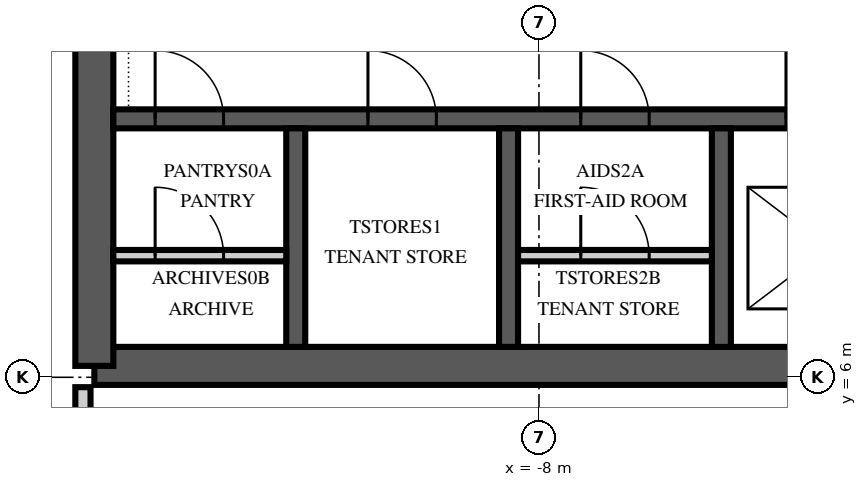
"""IFC4 building model, lengths in metres.
Left out: names, types, materials, properties, quantities, classifications, styles, units other than length and angle.
Written with IfcOpenShell. Run it as: python <this file> out.ifc"""

import sys

from ifc_helpers import new_model, si_unit, direction, frame, frame_2d, origin, place, context, subcontext, project, spatial, polyline, rectangle, outline, extrude, element, fill, save


model = new_model("IFC4")
c1 = context("Model", 3, precision=1e-05, world=origin(), true_north=direction((0.0, 1.0)))
c2 = subcontext(c1, "Body", "Model", "MODEL_VIEW")
j1 = project(units=[si_unit("LENGTHUNIT", "METRE"), si_unit("PLANEANGLEUNIT", "RADIAN")], contexts=[c1])
p1 = place(None, origin())
s1 = spatial("IfcSite", under=j1, at=p1, CompositionType="ELEMENT")
p2 = place(p1, origin())
s2 = spatial("IfcBuilding", under=s1, at=p2, CompositionType="ELEMENT")
p3 = place(p2, frame((0.0, 0.0, 312.0)))
s3 = spatial("IfcBuildingStorey", under=s2, at=p3, CompositionType="ELEMENT", Elevation=312.0)
p4 = place(p3, frame((-13.85, 6.15, 0.0), z_axis=(0.0, 0.0, 1.0), x_axis=(1.0, 0.0, 0.0)))
e1 = element("IfcWall", 1, at=p4, inside=s3, PredefinedType="SHEAR", context=c2, shape_type="SweptSolid", body=[
    extrude(rectangle(XDim=27.7, YDim=0.5, at=frame_2d((13.85, 0.0))), origin(), (0.0, 0.0, 1.0), 4.0),
])
p5 = place(p3, frame((-13.85, 23.85, 0.0), z_axis=(0.0, 0.0, 1.0), x_axis=(0.0, -1.0, 0.0)))
e2 = element("IfcWall", 2, at=p5, inside=s3, PredefinedType="SHEAR", context=c2, shape_type="SweptSolid", body=[
    extrude(outline(polyline([(0.0, -0.25), (17.7, -0.25), (17.7, 0.0), (17.45, 0.0), (17.45, 0.25), (0.25, 0.25), (0.25, 0.0), (0.0, 0.0), (0.0, -0.25)])), origin(), (0.0, 0.0, 1.0), 4.0),
])
p6 = place(p5, frame((11.75, 0.0, 0.0)))
e3 = element("IfcOpeningElement", 3, at=p6, cuts=e2, PredefinedType="OPENING", context=c2, shape_type="SweptSolid", body=[
    extrude(rectangle(XDim=1.8, YDim=2.4, at=frame_2d((0.9, 1.2))), frame((0.0, 0.265, 0.0), z_axis=(0.0, -1.0, 0.0), x_axis=(1.0, 0.0, 0.0)), (0.0, 0.0, 1.0), 0.53),
])
p7 = place(p3, frame((-13.6, 9.4, 0.0), z_axis=(0.0, 0.0, 1.0), x_axis=(1.0, 0.0, 0.0)))
e4 = element("IfcWall", 4, at=p7, inside=s3, PredefinedType="SHEAR", context=c2, shape_type="SweptSolid", body=[
    extrude(rectangle(XDim=27.2, YDim=0.25, at=frame_2d((13.6, 0.0))), origin(), (0.0, 0.0, 1.0), 4.0),
])
p8 = place(p7, frame((8.85, 0.0, 0.0)))
e5 = element("IfcOpeningElement", 5, at=p8, cuts=e4, PredefinedType="OPENING", context=c2, shape_type="SweptSolid", body=[
    extrude(rectangle(XDim=1.1, YDim=2.1, at=frame_2d((0.55, 1.05))), frame((0.0, 0.14, 0.0), z_axis=(0.0, -1.0, 0.0), x_axis=(1.0, 0.0, 0.0)), (0.0, 0.0, 1.0), 0.28),
])
p9 = place(p7, frame((11.65, 0.0, 0.0)))
e6 = element("IfcOpeningElement", 6, at=p9, cuts=e4, PredefinedType="OPENING", context=c2, shape_type="SweptSolid", body=[
    extrude(rectangle(XDim=1.1, YDim=2.1, at=frame_2d((0.55, 1.05))), frame((0.0, 0.14, 0.0), z_axis=(0.0, -1.0, 0.0), x_axis=(1.0, 0.0, 0.0)), (0.0, 0.0, 1.0), 0.28),
])
p10 = place(p7, frame((14.45, 0.0, 0.0)))
e7 = element("IfcOpeningElement", 7, at=p10, cuts=e4, PredefinedType="OPENING", context=c2, shape_type="SweptSolid", body=[
    extrude(rectangle(XDim=1.1, YDim=2.1, at=frame_2d((0.55, 1.05))), frame((0.0, 0.14, 0.0), z_axis=(0.0, -1.0, 0.0), x_axis=(1.0, 0.0, 0.0)), (0.0, 0.0, 1.0), 0.28),
])
p11 = place(p7, frame((0.55, 0.0, 0.0)))
e8 = element("IfcOpeningElement", 8, at=p11, cuts=e4, PredefinedType="OPENING", context=c2, shape_type="SweptSolid", body=[
    extrude(rectangle(XDim=0.9, YDim=2.1, at=frame_2d((0.45, 1.05))), frame((0.0, 0.14, 0.0), z_axis=(0.0, -1.0, 0.0), x_axis=(1.0, 0.0, 0.0)), (0.0, 0.0, 1.0), 0.28),
])
p12 = place(p7, frame((3.35, 0.0, 0.0)))
e9 = element("IfcOpeningElement", 9, at=p12, cuts=e4, PredefinedType="OPENING", context=c2, shape_type="SweptSolid", body=[
    extrude(rectangle(XDim=0.9, YDim=2.1, at=frame_2d((0.45, 1.05))), frame((0.0, 0.14, 0.0), z_axis=(0.0, -1.0, 0.0), x_axis=(1.0, 0.0, 0.0)), (0.0, 0.0, 1.0), 0.28),
])
p13 = place(p7, frame((6.15, 0.0, 0.0)))
e10 = element("IfcOpeningElement", 10, at=p13, cuts=e4, PredefinedType="OPENING", context=c2, shape_type="SweptSolid", body=[
    extrude(rectangle(XDim=0.9, YDim=2.1, at=frame_2d((0.45, 1.05))), frame((0.0, 0.14, 0.0), z_axis=(0.0, -1.0, 0.0), x_axis=(1.0, 0.0, 0.0)), (0.0, 0.0, 1.0), 0.28),
])
p14 = place(p7, frame((17.35, 0.0, 0.0)))
e11 = element("IfcOpeningElement", 11, at=p14, cuts=e4, PredefinedType="OPENING", context=c2, shape_type="SweptSolid", body=[
    extrude(rectangle(XDim=0.9, YDim=2.1, at=frame_2d((0.45, 1.05))), frame((0.0, 0.14, 0.0), z_axis=(0.0, -1.0, 0.0), x_axis=(1.0, 0.0, 0.0)), (0.0, 0.0, 1.0), 0.28),
])
p15 = place(p7, frame((20.15, 0.0, 0.0)))
e12 = element("IfcOpeningElement", 12, at=p15, cuts=e4, PredefinedType="OPENING", context=c2, shape_type="SweptSolid", body=[
    extrude(rectangle(XDim=0.9, YDim=2.1, at=frame_2d((0.45, 1.05))), frame((0.0, 0.14, 0.0), z_axis=(0.0, -1.0, 0.0), x_axis=(1.0, 0.0, 0.0)), (0.0, 0.0, 1.0), 0.28),
])
p16 = place(p7, frame((22.95, 0.0, 0.0)))
e13 = element("IfcOpeningElement", 13, at=p16, cuts=e4, PredefinedType="OPENING", context=c2, shape_type="SweptSolid", body=[
    extrude(rectangle(XDim=0.9, YDim=2.1, at=frame_2d((0.45, 1.05))), frame((0.0, 0.14, 0.0), z_axis=(0.0, -1.0, 0.0), x_axis=(1.0, 0.0, 0.0)), (0.0, 0.0, 1.0), 0.28),
])
for number, where, z_axis, x_axis in (
    (14, (-11.2, 6.4, 0.0), (0.0, 0.0, 1.0), (0.0, 1.0, 0.0)),
    (15, (-8.4, 6.4, 0.0), (0.0, 0.0, 1.0), (0.0, 1.0, 0.0)),
    (16, (-5.6, 6.4, 0.0), (0.0, 0.0, 1.0), (0.0, 1.0, 0.0)),
):
    element("IfcWall", number, at=place(p3, frame(where, z_axis=z_axis, x_axis=x_axis)), inside=s3, PredefinedType="SHEAR", context=c2, shape_type="SweptSolid", body=[
        extrude(rectangle(XDim=2.875, YDim=0.25, at=frame_2d((1.438, 0.0))), origin(), (0.0, 0.0, 1.0), 4.0),
    ])
p17 = place(p3, frame((-13.6, 7.6, 0.0), z_axis=(0.0, 0.0, 1.0), x_axis=(1.0, 0.0, 0.0)))
e17 = element("IfcWall", 17, at=p17, inside=s3, PredefinedType="PARTITIONING", context=c2, shape_type="SweptSolid", body=[
    extrude(rectangle(XDim=2.275, YDim=0.15, at=frame_2d((1.138, 0.0))), origin(), (0.0, 0.0, 1.0), 3.85),
])
p18 = place(p17, frame((0.55, 0.0, 0.0)))
e18 = element("IfcOpeningElement", 18, at=p18, cuts=e17, PredefinedType="OPENING", context=c2, shape_type="SweptSolid", body=[
    extrude(rectangle(XDim=0.9, YDim=2.1, at=frame_2d((0.45, 1.05))), frame((0.0, 0.09, 0.0), z_axis=(0.0, -1.0, 0.0), x_axis=(1.0, 0.0, 0.0)), (0.0, 0.0, 1.0), 0.18),
])
p19 = place(p3, frame((-8.275, 7.6, 0.0), z_axis=(0.0, 0.0, 1.0), x_axis=(1.0, 0.0, 0.0)))
e19 = element("IfcWall", 19, at=p19, inside=s3, PredefinedType="PARTITIONING", context=c2, shape_type="SweptSolid", body=[
    extrude(rectangle(XDim=2.55, YDim=0.15, at=frame_2d((1.275, 0.0))), origin(), (0.0, 0.0, 1.0), 3.85),
])
p20 = place(p19, frame((0.825, 0.0, 0.0)))
e20 = element("IfcOpeningElement", 20, at=p20, cuts=e19, PredefinedType="OPENING", context=c2, shape_type="SweptSolid", body=[
    extrude(rectangle(XDim=0.9, YDim=2.1, at=frame_2d((0.45, 1.05))), frame((0.0, 0.09, 0.0), z_axis=(0.0, -1.0, 0.0), x_axis=(1.0, 0.0, 0.0)), (0.0, 0.0, 1.0), 0.18),
])
p21 = place(p3, frame((-14.0, 3.675, 0.0), z_axis=(0.0, 0.0, 1.0), x_axis=(0.0, 1.0, 0.0)))
e21 = element("IfcWall", 21, at=p21, inside=s3, PredefinedType="PARTITIONING", context=c2, shape_type="SweptSolid", body=[
    extrude(rectangle(XDim=2.195, YDim=0.2, at=frame_2d((1.098, 0.0))), origin(), (0.0, 0.0, 1.0), 3.23),
])
p22 = place(p8, origin())
e22 = element("IfcDoor", 22, at=p22, inside=s3, OperationType="SLIDING_TO_LEFT", PredefinedType="DOOR", context=c2, shape_type="SweptSolid", body=[
    extrude(rectangle(XDim=1.1, YDim=2.1, at=frame_2d((0.55, 1.05))), frame((0.0, 0.125, 0.0), z_axis=(0.0, -1.0, 0.0), x_axis=(1.0, 0.0, 0.0)), (0.0, 0.0, 1.0), 0.25),
])
fill(e5, e22)
p23 = place(p11, origin())
e23 = element("IfcDoor", 23, at=p23, inside=s3, OperationType="SINGLE_SWING_LEFT", PredefinedType="DOOR", context=c2, shape_type="SweptSolid", body=[
    extrude(rectangle(XDim=0.9, YDim=2.1, at=frame_2d((0.45, 1.05))), frame((0.0, 0.125, 0.0), z_axis=(0.0, -1.0, 0.0), x_axis=(1.0, 0.0, 0.0)), (0.0, 0.0, 1.0), 0.25),
])
fill(e8, e23)
p24 = place(p18, origin())
e24 = element("IfcDoor", 24, at=p24, inside=s3, OperationType="SINGLE_SWING_LEFT", PredefinedType="DOOR", context=c2, shape_type="SweptSolid", body=[
    extrude(rectangle(XDim=0.9, YDim=2.1, at=frame_2d((0.45, 1.05))), frame((0.0, 0.075, 0.0), z_axis=(0.0, -1.0, 0.0), x_axis=(1.0, 0.0, 0.0)), (0.0, 0.0, 1.0), 0.149),
])
fill(e18, e24)
p25 = place(p12, origin())
e25 = element("IfcDoor", 25, at=p25, inside=s3, OperationType="SINGLE_SWING_LEFT", PredefinedType="DOOR", context=c2, shape_type="SweptSolid", body=[
    extrude(rectangle(XDim=0.9, YDim=2.1, at=frame_2d((0.45, 1.05))), frame((0.0, 0.125, 0.0), z_axis=(0.0, -1.0, 0.0), x_axis=(1.0, 0.0, 0.0)), (0.0, 0.0, 1.0), 0.25),
])
fill(e9, e25)
p26 = place(p13, origin())
e26 = element("IfcDoor", 26, at=p26, inside=s3, OperationType="SINGLE_SWING_LEFT", PredefinedType="DOOR", context=c2, shape_type="SweptSolid", body=[
    extrude(rectangle(XDim=0.9, YDim=2.1, at=frame_2d((0.45, 1.05))), frame((0.0, 0.125, 0.0), z_axis=(0.0, -1.0, 0.0), x_axis=(1.0, 0.0, 0.0)), (0.0, 0.0, 1.0), 0.25),
])
fill(e10, e26)
p27 = place(p20, origin())
e27 = element("IfcDoor", 27, at=p27, inside=s3, OperationType="SINGLE_SWING_LEFT", PredefinedType="DOOR", context=c2, shape_type="SweptSolid", body=[
    extrude(rectangle(XDim=0.9, YDim=2.1, at=frame_2d((0.45, 1.05))), frame((0.0, 0.075, 0.0), z_axis=(0.0, -1.0, 0.0), x_axis=(1.0, 0.0, 0.0)), (0.0, 0.0, 1.0), 0.149),
])
fill(e20, e27)
save(model, sys.argv[1])
